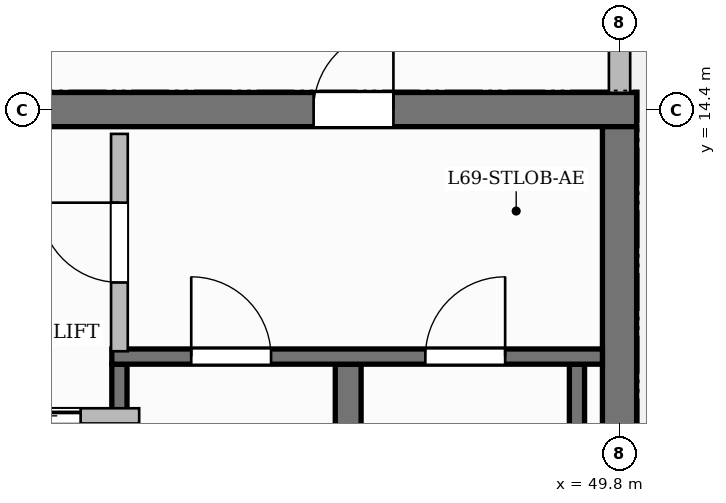
"""IFC4 building model, lengths in metres.
Left out: names, types, materials, properties, quantities, classifications, styles, units other than length and angle.
Written with IfcOpenShell. Run it as: python <this file> out.ifc"""

import sys

from ifc_helpers import new_model, si_unit, direction, frame, frame_2d, origin, place, context, subcontext, project, spatial, rectangle, extrude, source, transform, mapped, element, fill, save


model = new_model("IFC4")
c1 = context("Model", 3, precision=1e-05, world=origin(), true_north=direction((0.0, 1.0)))
c2 = subcontext(c1, "Body", "Model", "MODEL_VIEW")
j1 = project(units=[si_unit("LENGTHUNIT", "METRE"), si_unit("PLANEANGLEUNIT", "RADIAN")], contexts=[c1])
p1 = place(None, origin())
s1 = spatial("IfcSite", under=j1, at=p1, CompositionType="ELEMENT")
p2 = place(p1, origin())
s2 = spatial("IfcBuilding", under=s1, at=p2, CompositionType="ELEMENT")
p3 = place(p2, frame((0.0, 0.0, 275.05)))
s3 = spatial("IfcBuildingStorey", under=s2, at=p3, CompositionType="ELEMENT", Elevation=275.05)
p4 = place(p3, frame((34.575, 14.4, 0.0), z_axis=(0.0, 0.0, 1.0), x_axis=(1.0, 0.0, 0.0)))
e1 = element("IfcWall", 1, at=p4, inside=s3, PredefinedType="SHEAR", context=c2, shape_type="SweptSolid", body=[
    extrude(rectangle(XDim=15.45, YDim=0.45, at=frame_2d((7.725, 0.0))), origin(), (0.0, 0.0, 1.0), 3.85),
])
p5 = place(p4, frame((5.355, 0.0, 0.0)))
e2 = element("IfcOpeningElement", 2, at=p5, cuts=e1, PredefinedType="OPENING", context=c2, shape_type="SweptSolid", body=[
    extrude(rectangle(XDim=1.5, YDim=2.2, at=frame_2d((0.75, 1.1))), frame((0.0, 0.235, 0.0), z_axis=(0.0, -1.0, 0.0), x_axis=(1.0, 0.0, 0.0)), (0.0, 0.0, 1.0), 0.47),
])
p6 = place(p4, frame((1.57, 0.0, 0.0)))
e3 = element("IfcOpeningElement", 3, at=p6, cuts=e1, PredefinedType="OPENING", context=c2, shape_type="SweptSolid", body=[
    extrude(rectangle(XDim=1.05, YDim=2.15, at=frame_2d((0.525, 1.075))), frame((0.0, 0.235, 0.0), z_axis=(0.0, -1.0, 0.0), x_axis=(1.0, 0.0, 0.0)), (0.0, 0.0, 1.0), 0.47),
])
p7 = place(p4, frame((11.2, 0.0, 0.0)))
e4 = element("IfcOpeningElement", 4, at=p7, cuts=e1, PredefinedType="OPENING", context=c2, shape_type="SweptSolid", body=[
    extrude(rectangle(XDim=1.05, YDim=2.15, at=frame_2d((0.525, 1.075))), frame((0.0, 0.235, 0.0), z_axis=(0.0, -1.0, 0.0), x_axis=(1.0, 0.0, 0.0)), (0.0, 0.0, 1.0), 0.47),
])
p8 = place(p3, frame((49.8, 3.825, 0.0), z_axis=(0.0, 0.0, 1.0), x_axis=(0.0, 1.0, 0.0)))
e5 = element("IfcWall", 5, at=p8, inside=s3, PredefinedType="SHEAR", context=c2, shape_type="SweptSolid", body=[
    extrude(rectangle(XDim=10.35, YDim=0.45, at=frame_2d((5.175, 0.0))), origin(), (0.0, 0.0, 1.0), 3.85),
])
p9 = place(p3, frame((43.22, 4.1, 0.0), z_axis=(0.0, 0.0, 1.0), x_axis=(0.0, 1.0, 0.0)))
e6 = element("IfcWall", 6, at=p9, inside=s3, PredefinedType="SHEAR", context=c2, shape_type="SweptSolid", body=[
    extrude(rectangle(XDim=6.95, YDim=0.2, at=frame_2d((3.475, 0.0))), origin(), (0.0, 0.0, 1.0), 3.85),
])
p10 = place(p3, frame((46.23, 4.1, 0.0), z_axis=(0.0, 0.0, 1.0), x_axis=(0.0, 1.0, 0.0)))
e7 = element("IfcWall", 7, at=p10, inside=s3, PredefinedType="SHEAR", context=c2, shape_type="SweptSolid", body=[
    extrude(rectangle(XDim=6.95, YDim=0.34, at=frame_2d((3.475, 0.0))), origin(), (0.0, 0.0, 1.0), 3.85),
])
p11 = place(p3, frame((49.24, 4.1, 0.0), z_axis=(0.0, 0.0, 1.0), x_axis=(0.0, 1.0, 0.0)))
e8 = element("IfcWall", 8, at=p11, inside=s3, PredefinedType="SHEAR", context=c2, shape_type="SweptSolid", body=[
    extrude(rectangle(XDim=6.95, YDim=0.2, at=frame_2d((3.475, 0.0))), origin(), (0.0, 0.0, 1.0), 3.85),
])
p12 = place(p3, frame((43.12, 11.15, 0.0), z_axis=(0.0, 0.0, 1.0), x_axis=(1.0, 0.0, 0.0)))
e9 = element("IfcWall", 9, at=p12, inside=s3, PredefinedType="SHEAR", context=c2, shape_type="SweptSolid", body=[
    extrude(rectangle(XDim=6.455, YDim=0.2, at=frame_2d((3.228, 0.0))), origin(), (0.0, 0.0, 1.0), 3.85),
])
p13 = place(p12, frame((1.045, 0.0, 0.0)))
e10 = element("IfcOpeningElement", 10, at=p13, cuts=e9, PredefinedType="OPENING", context=c2, shape_type="SweptSolid", body=[
    extrude(rectangle(XDim=1.05, YDim=2.2, at=frame_2d((0.525, 1.1))), frame((0.0, 0.11, 0.0), z_axis=(0.0, -1.0, 0.0), x_axis=(1.0, 0.0, 0.0)), (0.0, 0.0, 1.0), 0.22),
])
p14 = place(p12, frame((4.125, 0.0, 0.0)))
e11 = element("IfcOpeningElement", 11, at=p14, cuts=e9, PredefinedType="OPENING", context=c2, shape_type="SweptSolid", body=[
    extrude(rectangle(XDim=1.05, YDim=2.2, at=frame_2d((0.525, 1.1))), frame((0.0, 0.11, 0.0), z_axis=(0.0, -1.0, 0.0), x_axis=(1.0, 0.0, 0.0)), (0.0, 0.0, 1.0), 0.22),
])
p15 = place(p3, frame((43.22, 11.22, 0.0), z_axis=(0.0, 0.0, 1.0), x_axis=(0.0, 1.0, 0.0)))
e12 = element("IfcWall", 12, at=p15, inside=s3, PredefinedType="PARTITIONING", context=c2, shape_type="SweptSolid", body=[
    extrude(rectangle(XDim=2.86, YDim=0.22, at=frame_2d((1.43, 0.0))), origin(), (0.0, 0.0, 1.0), 3.6),
])
p16 = place(p15, frame((0.905, 0.0, 0.0)))
e13 = element("IfcOpeningElement", 13, at=p16, cuts=e12, PredefinedType="OPENING", context=c2, shape_type="SweptSolid", body=[
    extrude(rectangle(XDim=1.05, YDim=2.15, at=frame_2d((0.525, 1.075))), frame((0.0, 0.12, 0.0), z_axis=(0.0, -1.0, 0.0), x_axis=(1.0, 0.0, 0.0)), (0.0, 0.0, 1.0), 0.24),
])
p17 = place(p3, frame((40.84, 10.37, 0.0), z_axis=(0.0, 0.0, 1.0), x_axis=(1.0, 0.0, 0.0)))
e14 = element("IfcWall", 14, at=p17, inside=s3, PredefinedType="PARTITIONING", context=c2, shape_type="SweptSolid", body=[
    extrude(rectangle(XDim=2.64, YDim=0.2, at=frame_2d((1.32, 0.0))), origin(), (0.0, 0.0, 1.0), 3.6),
])
p18 = place(p17, frame((0.77, 0.0, 0.0)))
e15 = element("IfcOpeningElement", 15, at=p18, cuts=e14, PredefinedType="OPENING", context=c2, shape_type="SweptSolid", body=[
    extrude(rectangle(XDim=1.1, YDim=2.2, at=frame_2d((0.55, 1.1))), frame((0.0, 0.11, 0.0), z_axis=(0.0, -1.0, 0.0), x_axis=(1.0, 0.0, 0.0)), (0.0, 0.0, 1.0), 0.22),
])
p19 = place(p3, frame((49.8, 14.62, 0.0), z_axis=(0.0, 0.0, 1.0), x_axis=(0.0, 1.0, 0.0)))
e16 = element("IfcWall", 16, at=p19, inside=s3, PredefinedType="SOLIDWALL", context=c2, shape_type="SweptSolid", body=[
    extrude(rectangle(XDim=6.93, YDim=0.28, at=frame_2d((3.465, 0.0))), origin(), (0.0, 0.0, 1.0), 3.185),
])
p20 = place(p19, frame((1.889, 0.0, 0.0)))
e17 = element("IfcOpeningElement", 17, at=p20, cuts=e16, PredefinedType="OPENING", context=c2, shape_type="SweptSolid", body=[
    extrude(rectangle(XDim=1.2, YDim=2.2, at=frame_2d((0.6, 1.1))), frame((0.0, 0.15, 0.0), z_axis=(0.0, -1.0, 0.0), x_axis=(1.0, 0.0, 0.0)), (0.0, 0.0, 1.0), 0.3),
])
p21 = place(p19, frame((3.884, 0.0, 0.8)))
e18 = element("IfcOpeningElement", 18, at=p21, cuts=e16, PredefinedType="OPENING", context=c2, shape_type="SweptSolid", body=[
    extrude(rectangle(XDim=1.8, YDim=1.85, at=frame_2d((0.9, 0.925))), frame((0.0, 0.15, 0.0), z_axis=(0.0, -1.0, 0.0), x_axis=(1.0, 0.0, 0.0)), (0.0, 0.0, 1.0), 0.3),
])
m1 = source(origin(), c2, "Body", "SweptSolid", [
    extrude(rectangle(XDim=1.05, YDim=2.2, at=frame_2d((0.525, 1.1))), frame((0.0, 0.025, 0.0), z_axis=(0.0, -1.0, 0.0), x_axis=(1.0, 0.0, 0.0)), (0.0, 0.0, 1.0), 0.05),
])
p22 = place(p13, origin())
e19 = element("IfcDoor", 19, at=p22, inside=s3, OperationType="SINGLE_SWING_LEFT", PredefinedType="DOOR", context=c2, shape_type="MappedRepresentation", body=[
    mapped(m1, transform((0.0, 0.0, 0.0), scale=1.0)),
])
fill(e10, e19)
p23 = place(p14, origin())
e20 = element("IfcDoor", 20, at=p23, inside=s3, OperationType="SINGLE_SWING_RIGHT", PredefinedType="DOOR", context=c2, shape_type="MappedRepresentation", body=[
    mapped(m1, transform((0.0, 0.0, 0.0), scale=1.0)),
])
fill(e11, e20)
m2 = source(origin(), c2, "Body", "SweptSolid", [
    extrude(rectangle(XDim=1.05, YDim=2.15, at=frame_2d((0.525, 1.075))), frame((0.0, 0.025, 0.0), z_axis=(0.0, -1.0, 0.0), x_axis=(1.0, 0.0, 0.0)), (0.0, 0.0, 1.0), 0.05),
])
p24 = place(p16, origin())
e21 = element("IfcDoor", 21, at=p24, inside=s3, OperationType="SINGLE_SWING_RIGHT", PredefinedType="DOOR", context=c2, shape_type="MappedRepresentation", body=[
    mapped(m2, transform((0.0, 0.0, 0.0), scale=1.0)),
])
fill(e13, e21)
p25 = place(p7, origin())
e22 = element("IfcDoor", 22, at=p25, inside=s3, OperationType="SINGLE_SWING_RIGHT", PredefinedType="DOOR", context=c2, shape_type="MappedRepresentation", body=[
    mapped(m2, transform((0.0, 0.0, 0.0), scale=1.0)),
])
fill(e4, e22)
m3 = source(origin(), c2, "Body", "SweptSolid", [
    extrude(rectangle(XDim=1.1, YDim=2.2, at=frame_2d((0.55, 1.1))), frame((0.0, 0.025, 0.0), z_axis=(0.0, -1.0, 0.0), x_axis=(1.0, 0.0, 0.0)), (0.0, 0.0, 1.0), 0.05),
])
p26 = place(p18, origin())
e23 = element("IfcDoor", 23, at=p26, inside=s3, OperationType="SLIDING_TO_LEFT", PredefinedType="DOOR", context=c2, shape_type="MappedRepresentation", body=[
    mapped(m3, transform((0.0, 0.0, 0.0), scale=1.0)),
])
fill(e15, e23)
save(model, sys.argv[1])
